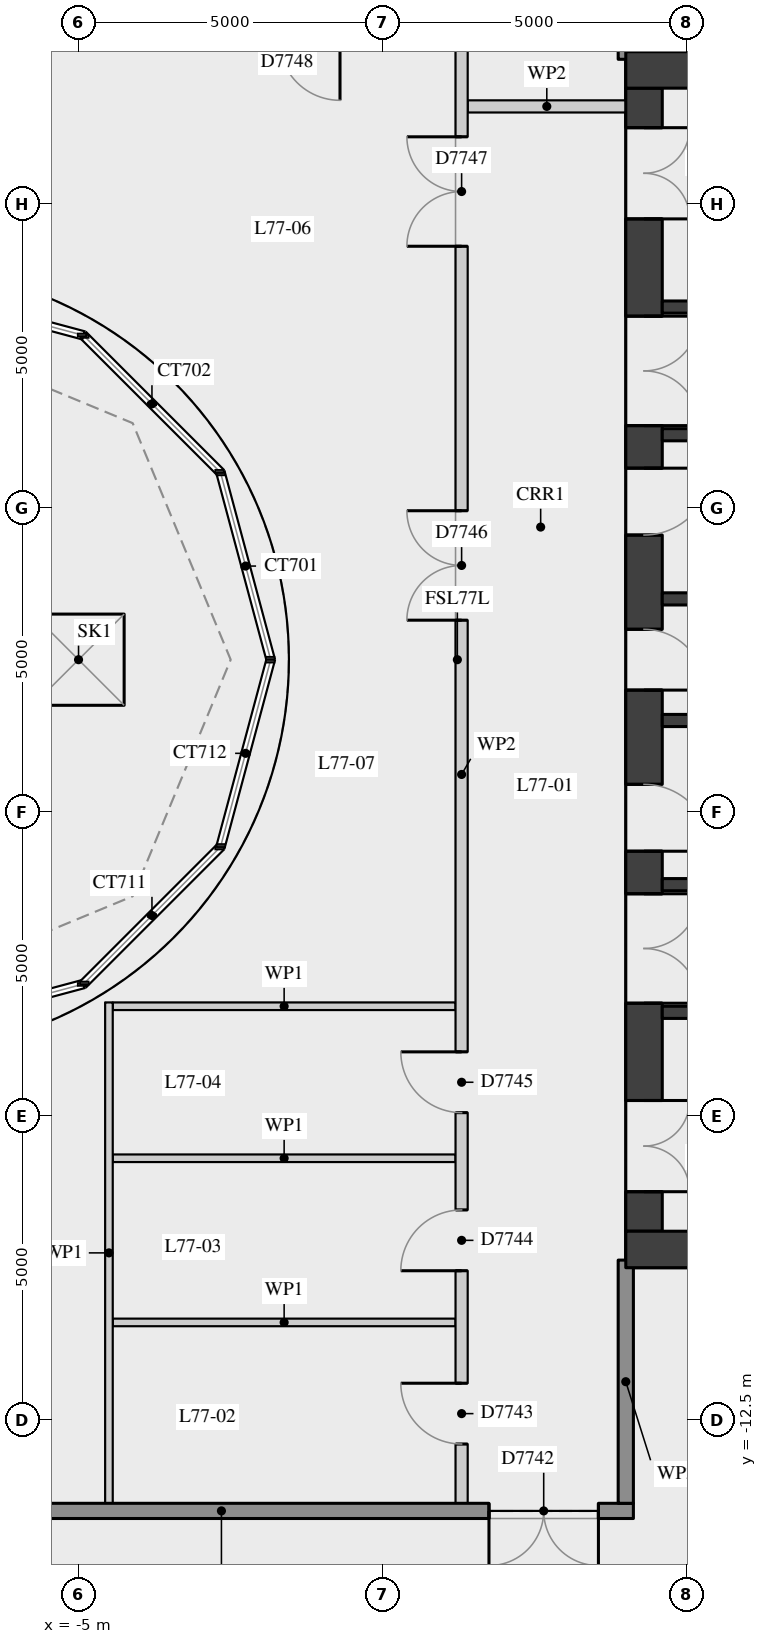
"""IFC4 building model, lengths in metres.
Left out: names, types, materials, properties, quantities, classifications, styles, units other than length and angle.
Written with IfcOpenShell. Run it as: python <this file> out.ifc"""

import sys

from ifc_helpers import new_model, si_unit, direction, frame, frame_2d, origin, origin_2d, place, context, subcontext, project, spatial, rectangle, extrude, element, fill, save


model = new_model("IFC4")
c1 = context("Model", 3, precision=1e-05, world=origin(), true_north=direction((0.0, 1.0)))
c2 = subcontext(c1, "Body", "Model", "MODEL_VIEW")
j1 = project(units=[si_unit("LENGTHUNIT", "METRE"), si_unit("PLANEANGLEUNIT", "RADIAN")], contexts=[c1])
p1 = place(None, origin())
s1 = spatial("IfcSite", under=j1, at=p1, CompositionType="ELEMENT")
p2 = place(p1, origin())
s2 = spatial("IfcBuilding", under=s1, at=p2, CompositionType="ELEMENT")
p3 = place(p2, frame((0.0, 0.0, 275.2)))
s3 = spatial("IfcBuildingStorey", under=s2, at=p3, CompositionType="ELEMENT", Elevation=275.2)
p4 = place(p3, frame((5.133, -18.012, 0.0), z_axis=(0.0, 0.0, 1.0), x_axis=(0.602567127341, 0.798068203256, 0.0)))
e1 = element("IfcWall", 1, at=p4, inside=s3, PredefinedType="USERDEFINED", context=c2, shape_type="SweptSolid", body=[
    extrude(rectangle(XDim=5.0, YDim=1.3, at=frame_2d((2.5, 0.0))), origin(), (0.0, 0.0, 1.0), 0.45),
])
p5 = place(p3, frame((4.3, -9.4, 0.0), z_axis=(0.0, 0.0, 1.0), x_axis=(0.0, 1.0, 0.0)))
e2 = element("IfcWall", 2, at=p5, inside=s3, PredefinedType="SHEAR", context=c2, shape_type="SweptSolid", body=[
    extrude(rectangle(XDim=18.8, YDim=0.6, at=frame_2d((9.4, 0.0))), origin(), (0.0, 0.0, 1.0), 5.0),
])
p6 = place(p5, frame((0.65, 0.0, 0.0)))
e3 = element("IfcOpeningElement", 3, at=p6, cuts=e2, PredefinedType="OPENING", context=c2, shape_type="SweptSolid", body=[
    extrude(rectangle(XDim=1.5, YDim=2.1, at=frame_2d((0.75, 1.05))), frame((0.0, 0.31, 0.0), z_axis=(0.0, -1.0, 0.0), x_axis=(1.0, 0.0, 0.0)), (0.0, 0.0, 1.0), 0.62),
])
p7 = place(p5, frame((3.75, 0.0, 0.0)))
e4 = element("IfcOpeningElement", 4, at=p7, cuts=e2, PredefinedType="OPENING", context=c2, shape_type="SweptSolid", body=[
    extrude(rectangle(XDim=1.8, YDim=2.1, at=frame_2d((0.9, 1.05))), frame((0.0, 0.31, 0.0), z_axis=(0.0, -1.0, 0.0), x_axis=(1.0, 0.0, 0.0)), (0.0, 0.0, 1.0), 0.62),
])
p8 = place(p5, frame((6.25, 0.0, 0.0)))
e5 = element("IfcOpeningElement", 5, at=p8, cuts=e2, PredefinedType="OPENING", context=c2, shape_type="SweptSolid", body=[
    extrude(rectangle(XDim=1.1, YDim=2.1, at=frame_2d((0.55, 1.05))), frame((0.0, 0.31, 0.0), z_axis=(0.0, -1.0, 0.0), x_axis=(1.0, 0.0, 0.0)), (0.0, 0.0, 1.0), 0.62),
])
p9 = place(p5, frame((8.9, 0.0, 0.0)))
e6 = element("IfcOpeningElement", 6, at=p9, cuts=e2, PredefinedType="OPENING", context=c2, shape_type="SweptSolid", body=[
    extrude(rectangle(XDim=1.0, YDim=2.1, at=frame_2d((0.5, 1.05))), frame((0.0, 0.31, 0.0), z_axis=(0.0, -1.0, 0.0), x_axis=(1.0, 0.0, 0.0)), (0.0, 0.0, 1.0), 0.62),
])
p10 = place(p5, frame((11.45, 0.0, 0.0)))
e7 = element("IfcOpeningElement", 7, at=p10, cuts=e2, PredefinedType="OPENING", context=c2, shape_type="SweptSolid", body=[
    extrude(rectangle(XDim=1.1, YDim=2.1, at=frame_2d((0.55, 1.05))), frame((0.0, 0.31, 0.0), z_axis=(0.0, -1.0, 0.0), x_axis=(1.0, 0.0, 0.0)), (0.0, 0.0, 1.0), 0.62),
])
p11 = place(p5, frame((13.25, 0.0, 0.0)))
e8 = element("IfcOpeningElement", 8, at=p11, cuts=e2, PredefinedType="OPENING", context=c2, shape_type="SweptSolid", body=[
    extrude(rectangle(XDim=1.8, YDim=2.1, at=frame_2d((0.9, 1.05))), frame((0.0, 0.31, 0.0), z_axis=(0.0, -1.0, 0.0), x_axis=(1.0, 0.0, 0.0)), (0.0, 0.0, 1.0), 0.62),
])
p12 = place(p5, frame((16.65, 0.0, 0.0)))
e9 = element("IfcOpeningElement", 9, at=p12, cuts=e2, PredefinedType="OPENING", context=c2, shape_type="SweptSolid", body=[
    extrude(rectangle(XDim=1.5, YDim=2.1, at=frame_2d((0.75, 1.05))), frame((0.0, 0.31, 0.0), z_axis=(0.0, -1.0, 0.0), x_axis=(1.0, 0.0, 0.0)), (0.0, 0.0, 1.0), 0.62),
])
for number, where, z_axis, x_axis in (
    (10, (4.0, 9.7, 0.0), (0.0, 0.0, 1.0), (1.0, 0.0, 0.0)),
    (11, (4.0, -9.7, 0.0), (0.0, 0.0, 1.0), (1.0, 0.0, 0.0)),
):
    element("IfcWall", number, at=place(p3, frame(where, z_axis=z_axis, x_axis=x_axis)), inside=s3, PredefinedType="SHEAR", context=c2, shape_type="SweptSolid", body=[
        extrude(rectangle(XDim=12.0, YDim=0.6, at=frame_2d((6.0, 0.0))), origin(), (0.0, 0.0, 1.0), 5.0),
    ])
p13 = place(p3, frame((4.6, 5.8, 0.0), z_axis=(0.0, 0.0, 1.0), x_axis=(1.0, 0.0, 0.0)))
e12 = element("IfcWall", 12, at=p13, inside=s3, PredefinedType="SHEAR", context=c2, shape_type="SweptSolid", body=[
    extrude(rectangle(XDim=10.8, YDim=0.2, at=frame_2d((5.4, 0.0))), origin(), (0.0, 0.0, 1.0), 5.0),
])
p14 = place(p13, frame((8.15, 0.0, 0.0)))
e13 = element("IfcOpeningElement", 13, at=p14, cuts=e12, PredefinedType="OPENING", context=c2, shape_type="SweptSolid", body=[
    extrude(rectangle(XDim=0.9, YDim=2.1, at=frame_2d((0.45, 1.05))), frame((0.0, 0.11, 0.0), z_axis=(0.0, -1.0, 0.0), x_axis=(1.0, 0.0, 0.0)), (0.0, 0.0, 1.0), 0.22),
])
p15 = place(p3, frame((4.6, 3.7, 0.0), z_axis=(0.0, 0.0, 1.0), x_axis=(1.0, 0.0, 0.0)))
e14 = element("IfcWall", 14, at=p15, inside=s3, PredefinedType="SHEAR", context=c2, shape_type="SweptSolid", body=[
    extrude(rectangle(XDim=10.8, YDim=0.2, at=frame_2d((5.4, 0.0))), origin(), (0.0, 0.0, 1.0), 5.0),
])
p16 = place(p15, frame((7.85, 0.0, 0.0)))
e15 = element("IfcOpeningElement", 15, at=p16, cuts=e14, PredefinedType="OPENING", context=c2, shape_type="SweptSolid", body=[
    extrude(rectangle(XDim=0.9, YDim=2.1, at=frame_2d((0.45, 1.05))), frame((0.0, 0.11, 0.0), z_axis=(0.0, -1.0, 0.0), x_axis=(1.0, 0.0, 0.0)), (0.0, 0.0, 1.0), 0.22),
])
for number, where, z_axis, x_axis in (
    (16, (4.6, 1.0, 0.0), (0.0, 0.0, 1.0), (1.0, 0.0, 0.0)),
    (17, (4.6, -1.0, 0.0), (0.0, 0.0, 1.0), (1.0, 0.0, 0.0)),
):
    element("IfcWall", number, at=place(p3, frame(where, z_axis=z_axis, x_axis=x_axis)), inside=s3, PredefinedType="SHEAR", context=c2, shape_type="SweptSolid", body=[
        extrude(rectangle(XDim=10.8, YDim=0.2, at=frame_2d((5.4, 0.0))), origin(), (0.0, 0.0, 1.0), 5.0),
    ])
p17 = place(p3, frame((4.6, -3.7, 0.0), z_axis=(0.0, 0.0, 1.0), x_axis=(1.0, 0.0, 0.0)))
e18 = element("IfcWall", 18, at=p17, inside=s3, PredefinedType="SHEAR", context=c2, shape_type="SweptSolid", body=[
    extrude(rectangle(XDim=10.8, YDim=0.2, at=frame_2d((5.4, 0.0))), origin(), (0.0, 0.0, 1.0), 5.0),
])
p18 = place(p17, frame((7.85, 0.0, 0.0)))
e19 = element("IfcOpeningElement", 19, at=p18, cuts=e18, PredefinedType="OPENING", context=c2, shape_type="SweptSolid", body=[
    extrude(rectangle(XDim=0.9, YDim=2.1, at=frame_2d((0.45, 1.05))), frame((0.0, 0.11, 0.0), z_axis=(0.0, -1.0, 0.0), x_axis=(1.0, 0.0, 0.0)), (0.0, 0.0, 1.0), 0.22),
])
p19 = place(p3, frame((4.6, -5.8, 0.0), z_axis=(0.0, 0.0, 1.0), x_axis=(1.0, 0.0, 0.0)))
e20 = element("IfcWall", 20, at=p19, inside=s3, PredefinedType="SHEAR", context=c2, shape_type="SweptSolid", body=[
    extrude(rectangle(XDim=10.8, YDim=0.2, at=frame_2d((5.4, 0.0))), origin(), (0.0, 0.0, 1.0), 5.0),
])
p20 = place(p19, frame((8.15, 0.0, 0.0)))
e21 = element("IfcOpeningElement", 21, at=p20, cuts=e20, PredefinedType="OPENING", context=c2, shape_type="SweptSolid", body=[
    extrude(rectangle(XDim=0.9, YDim=2.1, at=frame_2d((0.45, 1.05))), frame((0.0, 0.11, 0.0), z_axis=(0.0, -1.0, 0.0), x_axis=(1.0, 0.0, 0.0)), (0.0, 0.0, 1.0), 0.22),
])
p21 = place(p3, frame((-9.425, -14.0, 0.0), z_axis=(0.0, 0.0, 1.0), x_axis=(1.0, 0.0, 0.0)))
e22 = element("IfcWall", 22, at=p21, inside=s3, PredefinedType="PARTITIONING", context=c2, shape_type="SweptSolid", body=[
    extrude(rectangle(XDim=13.55, YDim=0.25, at=frame_2d((6.775, 0.0))), origin(), (0.0, 0.0, 1.0), 6.0),
])
p22 = place(p21, frame((1.525, 0.0, 0.0)))
e23 = element("IfcOpeningElement", 23, at=p22, cuts=e22, PredefinedType="OPENING", context=c2, shape_type="SweptSolid", body=[
    extrude(rectangle(XDim=1.8, YDim=2.4, at=frame_2d((0.9, 1.2))), frame((0.0, 0.135, 0.0), z_axis=(0.0, -1.0, 0.0), x_axis=(1.0, 0.0, 0.0)), (0.0, 0.0, 1.0), 0.27),
])
p23 = place(p21, frame((11.175, 0.0, 0.0)))
e24 = element("IfcOpeningElement", 24, at=p23, cuts=e22, PredefinedType="OPENING", context=c2, shape_type="SweptSolid", body=[
    extrude(rectangle(XDim=1.8, YDim=2.4, at=frame_2d((0.9, 1.2))), frame((0.0, 0.135, 0.0), z_axis=(0.0, -1.0, 0.0), x_axis=(1.0, 0.0, 0.0)), (0.0, 0.0, 1.0), 0.27),
])
for number, where, z_axis, x_axis in (
    (25, (-4.438, -10.9, 0.0), (0.0, 0.0, 1.0), (1.0, 0.0, 0.0)),
    (26, (-4.438, -8.2, 0.0), (0.0, 0.0, 1.0), (1.0, 0.0, 0.0)),
    (27, (-4.438, -5.7, 0.0), (0.0, 0.0, 1.0), (1.0, 0.0, 0.0)),
):
    element("IfcWall", number, at=place(p3, frame(where, z_axis=z_axis, x_axis=x_axis)), inside=s3, PredefinedType="PARTITIONING", context=c2, shape_type="SweptSolid", body=[
        extrude(rectangle(XDim=5.637, YDim=0.125, at=frame_2d((2.819, 0.0))), origin(), (0.0, 0.0, 1.0), 6.0),
    ])
p24 = place(p3, frame((1.4, 9.1, 0.0), z_axis=(0.0, 0.0, 1.0), x_axis=(1.0, 0.0, 0.0)))
e28 = element("IfcWall", 28, at=p24, inside=s3, PredefinedType="PARTITIONING", context=c2, shape_type="SweptSolid", body=[
    extrude(rectangle(XDim=2.602, YDim=0.2, at=frame_2d((1.301, 0.0))), origin(), (0.0, 0.0, 1.0), 6.0),
])
p25 = place(p3, frame((-4.5, -13.875, 0.0), z_axis=(0.0, 0.0, 1.0), x_axis=(0.0, 1.0, 0.0)))
e29 = element("IfcWall", 29, at=p25, inside=s3, PredefinedType="PARTITIONING", context=c2, shape_type="SweptSolid", body=[
    extrude(rectangle(XDim=8.238, YDim=0.125, at=frame_2d((4.119, 0.0))), origin(), (0.0, 0.0, 1.0), 6.0),
])
p26 = place(p3, frame((1.3, -13.875, 0.0), z_axis=(0.0, 0.0, 1.0), x_axis=(0.0, 1.0, 0.0)))
e30 = element("IfcWall", 30, at=p26, inside=s3, PredefinedType="PARTITIONING", context=c2, shape_type="SweptSolid", body=[
    extrude(rectangle(XDim=23.975, YDim=0.2, at=frame_2d((11.988, 0.0))), origin(), (0.0, 0.0, 1.0), 6.0),
])
p27 = place(p26, frame((20.675, 0.0, 0.0)))
e31 = element("IfcOpeningElement", 31, at=p27, cuts=e30, PredefinedType="OPENING", context=c2, shape_type="SweptSolid", body=[
    extrude(rectangle(XDim=1.8, YDim=2.1, at=frame_2d((0.9, 1.05))), frame((0.0, 0.11, 0.0), z_axis=(0.0, -1.0, 0.0), x_axis=(1.0, 0.0, 0.0)), (0.0, 0.0, 1.0), 0.22),
])
p28 = place(p26, frame((14.525, 0.0, 0.0)))
e32 = element("IfcOpeningElement", 32, at=p28, cuts=e30, PredefinedType="OPENING", context=c2, shape_type="SweptSolid", body=[
    extrude(rectangle(XDim=1.8, YDim=2.1, at=frame_2d((0.9, 1.05))), frame((0.0, 0.11, 0.0), z_axis=(0.0, -1.0, 0.0), x_axis=(1.0, 0.0, 0.0)), (0.0, 0.0, 1.0), 0.22),
])
p29 = place(p26, frame((0.975, 0.0, 0.0)))
e33 = element("IfcOpeningElement", 33, at=p29, cuts=e30, PredefinedType="OPENING", context=c2, shape_type="SweptSolid", body=[
    extrude(rectangle(XDim=1.0, YDim=2.1, at=frame_2d((0.5, 1.05))), frame((0.0, 0.11, 0.0), z_axis=(0.0, -1.0, 0.0), x_axis=(1.0, 0.0, 0.0)), (0.0, 0.0, 1.0), 0.22),
])
p30 = place(p26, frame((3.825, 0.0, 0.0)))
e34 = element("IfcOpeningElement", 34, at=p30, cuts=e30, PredefinedType="OPENING", context=c2, shape_type="SweptSolid", body=[
    extrude(rectangle(XDim=1.0, YDim=2.1, at=frame_2d((0.5, 1.05))), frame((0.0, 0.11, 0.0), z_axis=(0.0, -1.0, 0.0), x_axis=(1.0, 0.0, 0.0)), (0.0, 0.0, 1.0), 0.22),
])
p31 = place(p26, frame((6.425, 0.0, 0.0)))
e35 = element("IfcOpeningElement", 35, at=p31, cuts=e30, PredefinedType="OPENING", context=c2, shape_type="SweptSolid", body=[
    extrude(rectangle(XDim=1.0, YDim=2.1, at=frame_2d((0.5, 1.05))), frame((0.0, 0.11, 0.0), z_axis=(0.0, -1.0, 0.0), x_axis=(1.0, 0.0, 0.0)), (0.0, 0.0, 1.0), 0.22),
])
for number, where, z_axis, x_axis in (
    (36, (4.0, -13.875, 0.0), (0.0, 0.0, 1.0), (0.0, 1.0, 0.0)),
    (37, (4.0, 9.875, 0.0), (0.0, 0.0, 1.0), (0.0, 1.0, 0.0)),
):
    element("IfcWall", number, at=place(p3, frame(where, z_axis=z_axis, x_axis=x_axis)), inside=s3, PredefinedType="PARTITIONING", context=c2, shape_type="SweptSolid", body=[
        extrude(rectangle(XDim=4.0, YDim=0.25, at=frame_2d((2.0, 0.0))), origin(), (0.0, 0.0, 1.0), 6.0),
    ])
p32 = place(p3, frame((0.0, 0.0, 1.8)))
p33 = place(p32, frame((-5.0, 0.0, 0.0)))
p34 = place(p33, frame((0.0, 0.0, 0.1)))
e38 = element("IfcWindow", 38, at=p34, inside=s3, PartitioningType="SINGLE_PANEL", PredefinedType="SKYLIGHT", context=c2, shape_type="SweptSolid", body=[
    extrude(rectangle(XDim=1.5, YDim=1.5, at=origin_2d()), origin(), (0.0, 0.0, 1.0), 0.05),
])
p35 = place(p6, origin())
e39 = element("IfcDoor", 39, at=p35, inside=s3, OperationType="DOUBLE_DOOR_SINGLE_SWING", PredefinedType="DOOR", context=c2, shape_type="SweptSolid", body=[
    extrude(rectangle(XDim=1.5, YDim=2.1, at=frame_2d((0.75, 1.05))), frame((0.0, 0.025, 0.0), z_axis=(0.0, -1.0, 0.0), x_axis=(1.0, 0.0, 0.0)), (0.0, 0.0, 1.0), 0.05),
])
fill(e3, e39)
p36 = place(p7, origin())
e40 = element("IfcDoor", 40, at=p36, inside=s3, OperationType="DOUBLE_DOOR_SINGLE_SWING", PredefinedType="DOOR", context=c2, shape_type="SweptSolid", body=[
    extrude(rectangle(XDim=1.8, YDim=2.1, at=frame_2d((0.9, 1.05))), frame((0.0, 0.025, 0.0), z_axis=(0.0, -1.0, 0.0), x_axis=(1.0, 0.0, 0.0)), (0.0, 0.0, 1.0), 0.05),
])
fill(e4, e40)
p37 = place(p8, origin())
e41 = element("IfcDoor", 41, at=p37, inside=s3, OperationType="SINGLE_SWING_RIGHT", PredefinedType="DOOR", context=c2, shape_type="SweptSolid", body=[
    extrude(rectangle(XDim=1.1, YDim=2.1, at=frame_2d((0.55, 1.05))), frame((0.0, 0.025, 0.0), z_axis=(0.0, -1.0, 0.0), x_axis=(1.0, 0.0, 0.0)), (0.0, 0.0, 1.0), 0.05),
])
fill(e5, e41)
p38 = place(p9, origin())
e42 = element("IfcDoor", 42, at=p38, inside=s3, OperationType="SINGLE_SWING_RIGHT", PredefinedType="DOOR", context=c2, shape_type="SweptSolid", body=[
    extrude(rectangle(XDim=1.0, YDim=2.1, at=frame_2d((0.5, 1.05))), frame((0.0, 0.025, 0.0), z_axis=(0.0, -1.0, 0.0), x_axis=(1.0, 0.0, 0.0)), (0.0, 0.0, 1.0), 0.05),
])
fill(e6, e42)
p39 = place(p10, origin())
e43 = element("IfcDoor", 43, at=p39, inside=s3, OperationType="SINGLE_SWING_LEFT", PredefinedType="DOOR", context=c2, shape_type="SweptSolid", body=[
    extrude(rectangle(XDim=1.1, YDim=2.1, at=frame_2d((0.55, 1.05))), frame((0.0, 0.025, 0.0), z_axis=(0.0, -1.0, 0.0), x_axis=(1.0, 0.0, 0.0)), (0.0, 0.0, 1.0), 0.05),
])
fill(e7, e43)
p40 = place(p11, origin())
e44 = element("IfcDoor", 44, at=p40, inside=s3, OperationType="DOUBLE_DOOR_SINGLE_SWING", PredefinedType="DOOR", context=c2, shape_type="SweptSolid", body=[
    extrude(rectangle(XDim=1.8, YDim=2.1, at=frame_2d((0.9, 1.05))), frame((0.0, 0.025, 0.0), z_axis=(0.0, -1.0, 0.0), x_axis=(1.0, 0.0, 0.0)), (0.0, 0.0, 1.0), 0.05),
])
fill(e8, e44)
p41 = place(p12, origin())
e45 = element("IfcDoor", 45, at=p41, inside=s3, OperationType="DOUBLE_DOOR_SINGLE_SWING", PredefinedType="DOOR", context=c2, shape_type="SweptSolid", body=[
    extrude(rectangle(XDim=1.5, YDim=2.1, at=frame_2d((0.75, 1.05))), frame((0.0, 0.025, 0.0), z_axis=(0.0, -1.0, 0.0), x_axis=(1.0, 0.0, 0.0)), (0.0, 0.0, 1.0), 0.05),
])
fill(e9, e45)
p42 = place(p27, origin())
e46 = element("IfcDoor", 46, at=p42, inside=s3, OperationType="DOUBLE_DOOR_SINGLE_SWING", PredefinedType="DOOR", context=c2, shape_type="SweptSolid", body=[
    extrude(rectangle(XDim=1.8, YDim=2.1, at=frame_2d((0.9, 1.05))), frame((0.0, 0.025, 0.0), z_axis=(0.0, -1.0, 0.0), x_axis=(1.0, 0.0, 0.0)), (0.0, 0.0, 1.0), 0.05),
])
fill(e31, e46)
p43 = place(p28, origin())
e47 = element("IfcDoor", 47, at=p43, inside=s3, OperationType="DOUBLE_DOOR_SINGLE_SWING", PredefinedType="DOOR", context=c2, shape_type="SweptSolid", body=[
    extrude(rectangle(XDim=1.8, YDim=2.1, at=frame_2d((0.9, 1.05))), frame((0.0, 0.025, 0.0), z_axis=(0.0, -1.0, 0.0), x_axis=(1.0, 0.0, 0.0)), (0.0, 0.0, 1.0), 0.05),
])
fill(e32, e47)
p44 = place(p29, origin())
e48 = element("IfcDoor", 48, at=p44, inside=s3, OperationType="SINGLE_SWING_RIGHT", PredefinedType="DOOR", context=c2, shape_type="SweptSolid", body=[
    extrude(rectangle(XDim=1.0, YDim=2.1, at=frame_2d((0.5, 1.05))), frame((0.0, 0.025, 0.0), z_axis=(0.0, -1.0, 0.0), x_axis=(1.0, 0.0, 0.0)), (0.0, 0.0, 1.0), 0.05),
])
fill(e33, e48)
p45 = place(p30, origin())
e49 = element("IfcDoor", 49, at=p45, inside=s3, OperationType="SINGLE_SWING_LEFT", PredefinedType="DOOR", context=c2, shape_type="SweptSolid", body=[
    extrude(rectangle(XDim=1.0, YDim=2.1, at=frame_2d((0.5, 1.05))), frame((0.0, 0.025, 0.0), z_axis=(0.0, -1.0, 0.0), x_axis=(1.0, 0.0, 0.0)), (0.0, 0.0, 1.0), 0.05),
])
fill(e34, e49)
p46 = place(p31, origin())
e50 = element("IfcDoor", 50, at=p46, inside=s3, OperationType="SINGLE_SWING_RIGHT", PredefinedType="DOOR", context=c2, shape_type="SweptSolid", body=[
    extrude(rectangle(XDim=1.0, YDim=2.1, at=frame_2d((0.5, 1.05))), frame((0.0, 0.025, 0.0), z_axis=(0.0, -1.0, 0.0), x_axis=(1.0, 0.0, 0.0)), (0.0, 0.0, 1.0), 0.05),
])
fill(e35, e50)
p47 = place(p23, origin())
e51 = element("IfcDoor", 51, at=p47, inside=s3, OperationType="DOUBLE_DOOR_SINGLE_SWING", PredefinedType="DOOR", context=c2, shape_type="SweptSolid", body=[
    extrude(rectangle(XDim=1.8, YDim=2.4, at=frame_2d((0.9, 1.2))), frame((0.0, 0.025, 0.0), z_axis=(0.0, -1.0, 0.0), x_axis=(1.0, 0.0, 0.0)), (0.0, 0.0, 1.0), 0.05),
])
fill(e24, e51)
save(model, sys.argv[1])
